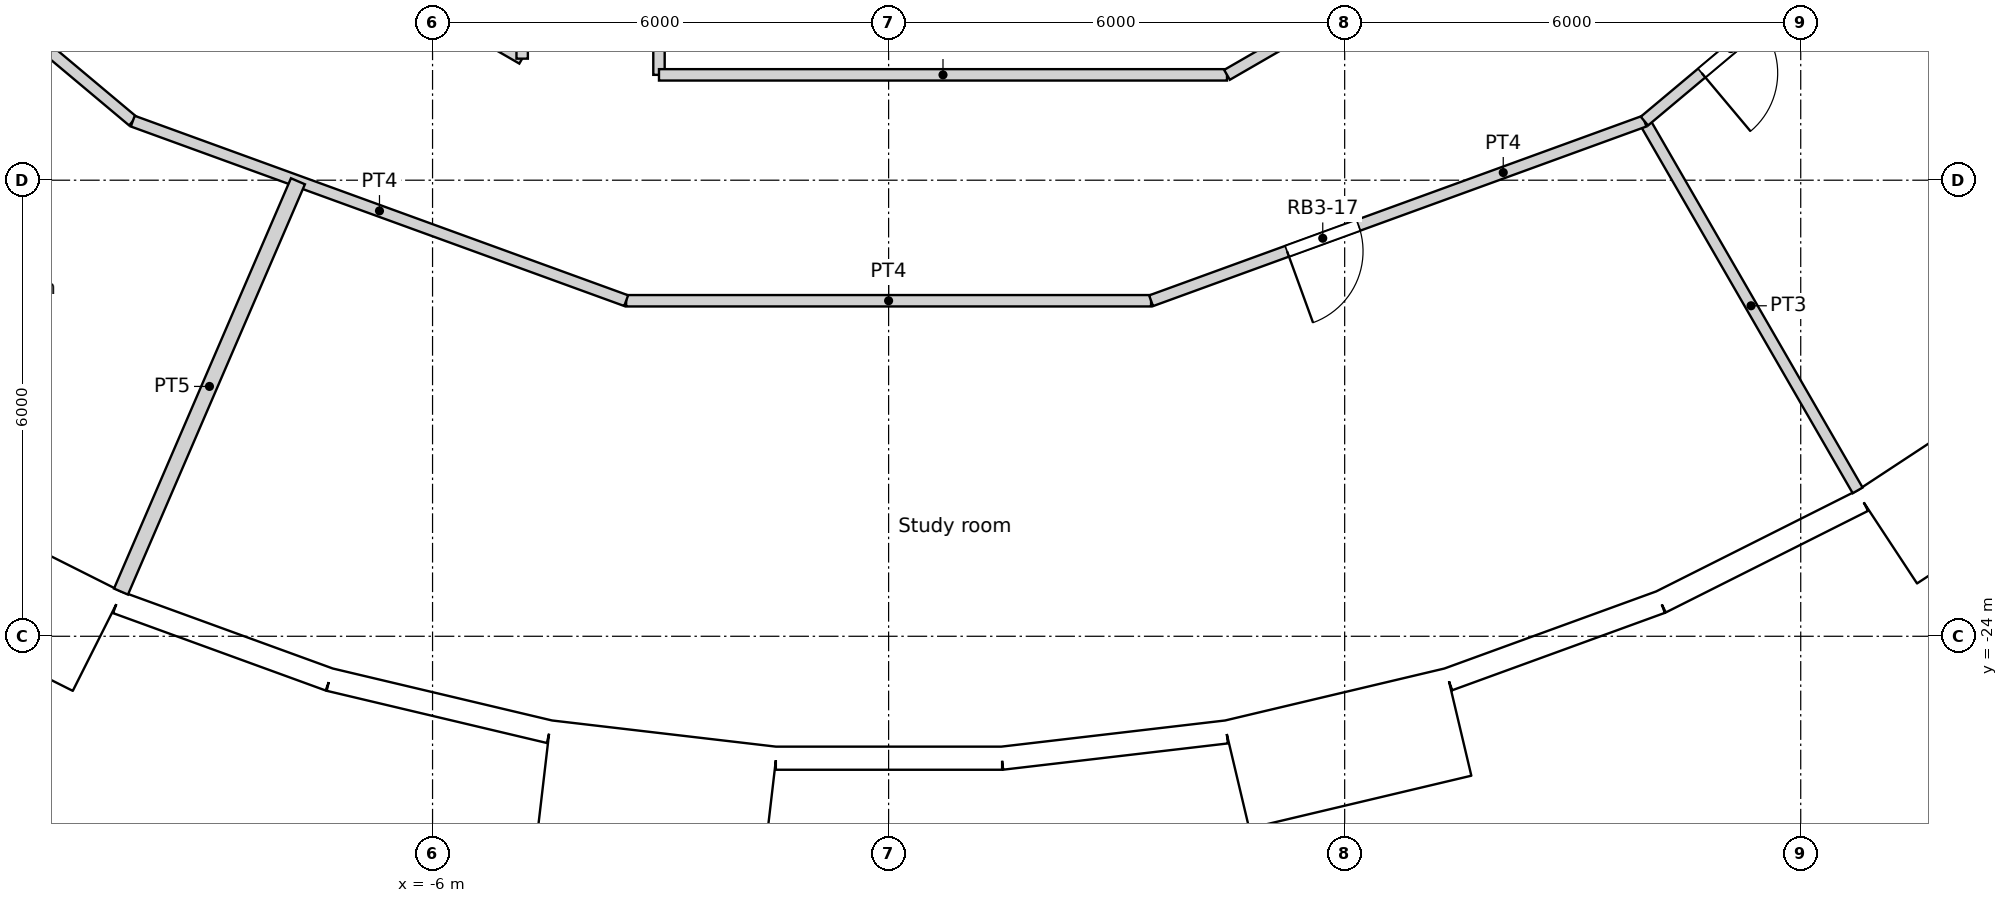
"""IFC4 building model, lengths in metres.
Left out: names, types, materials, properties, quantities, classifications, styles, units other than length and angle.
Written with IfcOpenShell. Run it as: python <this file> out.ifc"""

import sys

from ifc_helpers import new_model, si_unit, direction, frame, frame_2d, origin, origin_2d, place, context, subcontext, project, spatial, rectangle, circle, extrude, element, fill, save


model = new_model("IFC4")
c1 = context("Model", 3, precision=1e-05, world=origin(), true_north=direction((0.0, 1.0)))
c2 = subcontext(c1, "Body", "Model", "MODEL_VIEW")
j1 = project(units=[si_unit("LENGTHUNIT", "METRE"), si_unit("PLANEANGLEUNIT", "RADIAN")], contexts=[c1])
p1 = place(None, origin())
s1 = spatial("IfcSite", under=j1, at=p1, CompositionType="ELEMENT")
p2 = place(p1, origin())
s2 = spatial("IfcBuilding", under=s1, at=p2, CompositionType="ELEMENT")
p3 = place(p2, frame((0.0, 0.0, 147.6)))
s3 = spatial("IfcBuildingStorey", under=s2, at=p3, CompositionType="ELEMENT", Elevation=147.6)
for number, where, z_axis, x_axis in (
    (1, (-7.04, -23.516, 0.0), (0.0, 0.0, 1.0), (1.0, 0.0, 0.0)),
    (2, (-1.427, -24.506, 0.0), (0.0, 0.0, 1.0), (1.0, 0.0, 0.0)),
    (3, (4.263, -24.175, 0.0), (0.0, 0.0, 1.0), (1.0, 0.0, 0.0)),
    (4, (9.723, -22.54, 0.0), (0.0, 0.0, 1.0), (1.0, 0.0, 0.0)),
):
    element("IfcColumn", number, at=place(p3, frame(where, z_axis=z_axis, x_axis=x_axis)), inside=s3, PredefinedType="COLUMN", context=c2, shape_type="SweptSolid", body=[
        extrude(circle(Radius=0.6, at=origin_2d()), origin(), (0.0, 0.0, 1.0), 3.6),
    ])
for number, where, z_axis, x_axis in (
    (5, (-9.411, -16.301, 0.0), (0.0, 0.0, 1.0), (1.0, 0.0, 0.0)),
    (6, (-4.188, -18.35, 0.0), (0.0, 0.0, 1.0), (1.0, 0.0, 0.0)),
    (7, (1.406, -18.77, 0.0), (0.0, 0.0, 1.0), (1.0, 0.0, 0.0)),
    (8, (6.876, -17.521, 0.0), (0.0, 0.0, 1.0), (1.0, 0.0, 0.0)),
):
    element("IfcColumn", number, at=place(p3, frame(where, z_axis=z_axis, x_axis=x_axis)), inside=s3, PredefinedType="COLUMN", context=c2, shape_type="SweptSolid", body=[
        extrude(circle(Radius=0.65, at=origin_2d()), origin(), (0.0, 0.0, 1.0), 3.6),
    ])
p4 = place(p3, frame((-13.09, -22.721, -0.3), z_axis=(0.0, 0.0, 1.0), x_axis=(0.893628249713, -0.448807922518, 0.0)))
e9 = element("IfcWall", 9, at=p4, inside=s3, PredefinedType="ELEMENTEDWALL", context=c2, shape_type="SweptSolid", body=[
    extrude(rectangle(XDim=3.0, YDim=1.45, at=frame_2d((1.5, 0.0))), origin(), (0.0, 0.0, 1.0), 3.6),
])
p5 = place(p4, frame((1.5, 0.0, 1.85)))
e10 = element("IfcOpeningElement", 10, at=p5, cuts=e9, PredefinedType="OPENING", context=c2, shape_type="SweptSolid", body=[
    extrude(circle(Radius=0.9, at=origin_2d()), frame((0.0, 0.735, 0.0), z_axis=(0.0, -1.0, 0.0), x_axis=(1.0, 0.0, 0.0)), (0.0, 0.0, 1.0), 1.47),
])
p6 = place(p3, frame((-10.149, -23.553, 0.0), z_axis=(0.0, 0.0, 1.0), x_axis=(0.939690282133, -0.342026568652, 0.0)))
e11 = element("IfcWall", 11, at=p6, inside=s3, PredefinedType="SOLIDWALL", context=c2, shape_type="SweptSolid", body=[
    extrude(rectangle(XDim=2.973, YDim=0.3, at=frame_2d((1.486, 0.0))), origin(), (0.0, 0.0, 1.0), 3.3),
])
p7 = place(p6, frame((1.486, 0.0, 1.55)))
e12 = element("IfcOpeningElement", 12, at=p7, cuts=e11, PredefinedType="OPENING", context=c2, shape_type="SweptSolid", body=[
    extrude(circle(Radius=0.9, at=origin_2d()), frame((0.0, 0.16, 0.0), z_axis=(0.0, -1.0, 0.0), x_axis=(1.0, 0.0, 0.0)), (0.0, 0.0, 1.0), 0.32),
])
p8 = place(p3, frame((-7.356, -24.57, 0.0), z_axis=(0.0, 0.0, 1.0), x_axis=(0.973045378923, -0.230613725862, 0.0)))
e13 = element("IfcWall", 13, at=p8, inside=s3, PredefinedType="SOLIDWALL", context=c2, shape_type="SweptSolid", body=[
    extrude(rectangle(XDim=2.973, YDim=0.3, at=frame_2d((1.486, 0.0))), origin(), (0.0, 0.0, 1.0), 3.3),
])
p9 = place(p8, frame((1.486, 0.0, 1.55)))
e14 = element("IfcOpeningElement", 14, at=p9, cuts=e13, PredefinedType="OPENING", context=c2, shape_type="SweptSolid", body=[
    extrude(circle(Radius=0.9, at=origin_2d()), frame((0.0, 0.16, 0.0), z_axis=(0.0, -1.0, 0.0), x_axis=(1.0, 0.0, 0.0)), (0.0, 0.0, 1.0), 0.32),
])
p10 = place(p3, frame((-4.529, -25.828, -0.3), z_axis=(0.0, 0.0, 1.0), x_axis=(0.9932342274, -0.116128246006, 0.0)))
e15 = element("IfcWall", 15, at=p10, inside=s3, PredefinedType="ELEMENTEDWALL", context=c2, shape_type="SweptSolid", body=[
    extrude(rectangle(XDim=3.0, YDim=1.45, at=frame_2d((1.5, 0.0))), origin(), (0.0, 0.0, 1.0), 3.6),
])
p11 = place(p10, frame((1.5, 0.0, 1.85)))
e16 = element("IfcOpeningElement", 16, at=p11, cuts=e15, PredefinedType="OPENING", context=c2, shape_type="SweptSolid", body=[
    extrude(circle(Radius=0.9, at=origin_2d()), frame((0.0, 0.735, 0.0), z_axis=(0.0, -1.0, 0.0), x_axis=(1.0, 0.0, 0.0)), (0.0, 0.0, 1.0), 1.47),
])
p12 = place(p3, frame((-1.482, -25.604, 0.0), z_axis=(0.0, 0.0, 1.0), x_axis=(1.0, 0.0, 0.0)))
e17 = element("IfcWall", 17, at=p12, inside=s3, PredefinedType="SOLIDWALL", context=c2, shape_type="SweptSolid", body=[
    extrude(rectangle(XDim=2.973, YDim=0.3, at=frame_2d((1.486, 0.0))), origin(), (0.0, 0.0, 1.0), 3.3),
])
p13 = place(p12, frame((1.486, 0.0, 1.55)))
e18 = element("IfcOpeningElement", 18, at=p13, cuts=e17, PredefinedType="OPENING", context=c2, shape_type="SweptSolid", body=[
    extrude(circle(Radius=0.9, at=origin_2d()), frame((0.0, 0.16, 0.0), z_axis=(0.0, -1.0, 0.0), x_axis=(1.0, 0.0, 0.0)), (0.0, 0.0, 1.0), 0.32),
])
p14 = place(p3, frame((1.491, -25.604, 0.0), z_axis=(0.0, 0.0, 1.0), x_axis=(0.993245010522, 0.1160359818, 0.0)))
e19 = element("IfcWall", 19, at=p14, inside=s3, PredefinedType="SOLIDWALL", context=c2, shape_type="SweptSolid", body=[
    extrude(rectangle(XDim=2.973, YDim=0.3, at=frame_2d((1.486, 0.0))), origin(), (0.0, 0.0, 1.0), 3.3),
])
p15 = place(p14, frame((1.486, 0.0, 1.55)))
e20 = element("IfcOpeningElement", 20, at=p15, cuts=e19, PredefinedType="OPENING", context=c2, shape_type="SweptSolid", body=[
    extrude(circle(Radius=0.9, at=origin_2d()), frame((0.0, 0.16, 0.0), z_axis=(0.0, -1.0, 0.0), x_axis=(1.0, 0.0, 0.0)), (0.0, 0.0, 1.0), 0.32),
])
p16 = place(p3, frame((4.578, -25.819, -0.3), z_axis=(0.0, 0.0, 1.0), x_axis=(0.973042333261, 0.23062657627, 0.0)))
e21 = element("IfcWall", 21, at=p16, inside=s3, PredefinedType="ELEMENTEDWALL", context=c2, shape_type="SweptSolid", body=[
    extrude(rectangle(XDim=3.0, YDim=1.45, at=frame_2d((1.5, 0.0))), origin(), (0.0, 0.0, 1.0), 3.6),
])
p17 = place(p16, frame((1.5, 0.0, 1.85)))
e22 = element("IfcOpeningElement", 22, at=p17, cuts=e21, PredefinedType="OPENING", context=c2, shape_type="SweptSolid", body=[
    extrude(circle(Radius=0.9, at=origin_2d()), frame((0.0, 0.735, 0.0), z_axis=(0.0, -1.0, 0.0), x_axis=(1.0, 0.0, 0.0)), (0.0, 0.0, 1.0), 1.47),
])
p18 = place(p3, frame((7.365, -24.567, 0.0), z_axis=(0.0, 0.0, 1.0), x_axis=(0.939690282133, 0.342026568652, 0.0)))
e23 = element("IfcWall", 23, at=p18, inside=s3, PredefinedType="SOLIDWALL", context=c2, shape_type="SweptSolid", body=[
    extrude(rectangle(XDim=2.973, YDim=0.3, at=frame_2d((1.486, 0.0))), origin(), (0.0, 0.0, 1.0), 3.3),
])
p19 = place(p18, frame((1.486, 0.0, 1.55)))
e24 = element("IfcOpeningElement", 24, at=p19, cuts=e23, PredefinedType="OPENING", context=c2, shape_type="SweptSolid", body=[
    extrude(circle(Radius=0.9, at=origin_2d()), frame((0.0, 0.16, 0.0), z_axis=(0.0, -1.0, 0.0), x_axis=(1.0, 0.0, 0.0)), (0.0, 0.0, 1.0), 0.32),
])
p20 = place(p3, frame((10.158, -23.55, 0.0), z_axis=(0.0, 0.0, 1.0), x_axis=(0.893637442555, 0.448789618045, 0.0)))
e25 = element("IfcWall", 25, at=p20, inside=s3, PredefinedType="SOLIDWALL", context=c2, shape_type="SweptSolid", body=[
    extrude(rectangle(XDim=2.973, YDim=0.3, at=frame_2d((1.486, 0.0))), origin(), (0.0, 0.0, 1.0), 3.3),
])
p21 = place(p20, frame((1.486, 0.0, 1.55)))
e26 = element("IfcOpeningElement", 26, at=p21, cuts=e25, PredefinedType="OPENING", context=c2, shape_type="SweptSolid", body=[
    extrude(circle(Radius=0.9, at=origin_2d()), frame((0.0, 0.16, 0.0), z_axis=(0.0, -1.0, 0.0), x_axis=(1.0, 0.0, 0.0)), (0.0, 0.0, 1.0), 0.32),
])
p22 = place(p3, frame((13.132, -22.697, -0.3), z_axis=(0.0, 0.0, 1.0), x_axis=(0.835514416706, 0.549468524554, 0.0)))
e27 = element("IfcWall", 27, at=p22, inside=s3, PredefinedType="ELEMENTEDWALL", context=c2, shape_type="SweptSolid", body=[
    extrude(rectangle(XDim=3.0, YDim=1.45, at=frame_2d((1.5, 0.0))), origin(), (0.0, 0.0, 1.0), 3.6),
])
p23 = place(p22, frame((1.5, 0.0, 1.85)))
e28 = element("IfcOpeningElement", 28, at=p23, cuts=e27, PredefinedType="OPENING", context=c2, shape_type="SweptSolid", body=[
    extrude(circle(Radius=0.9, at=origin_2d()), frame((0.0, 0.735, 0.0), z_axis=(0.0, -1.0, 0.0), x_axis=(1.0, 0.0, 0.0)), (0.0, 0.0, 1.0), 1.47),
])
p24 = place(p3, frame((9.943, -17.222, 0.0), z_axis=(0.0, 0.0, 1.0), x_axis=(0.766192104565, 0.642611592567, 0.0)))
e29 = element("IfcWall", 29, at=p24, inside=s3, PredefinedType="PARTITIONING", context=c2, shape_type="SweptSolid", body=[
    extrude(rectangle(XDim=6.906, YDim=0.15, at=frame_2d((3.453, 0.0))), origin(), (0.0, 0.0, 1.0), 3.3),
])
p25 = place(p24, frame((0.984, 0.0, 0.0)))
e30 = element("IfcOpeningElement", 30, at=p25, cuts=e29, PredefinedType="OPENING", context=c2, shape_type="SweptSolid", body=[
    extrude(rectangle(XDim=1.0, YDim=2.04, at=frame_2d((0.5, 1.02))), frame((0.0, 0.075, 0.0), z_axis=(0.0, -1.0, 0.0), x_axis=(1.0, 0.0, 0.0)), (0.0, 0.0, 1.0), 0.15),
])
p26 = place(p3, frame((-15.235, -12.784, 0.0), z_axis=(0.0, 0.0, 1.0), x_axis=(0.766192104565, -0.642611592567, 0.0)))
e31 = element("IfcWall", 31, at=p26, inside=s3, PredefinedType="PARTITIONING", context=c2, shape_type="SweptSolid", body=[
    extrude(rectangle(XDim=6.906, YDim=0.15, at=frame_2d((3.453, 0.0))), origin(), (0.0, 0.0, 1.0), 3.3),
])
p27 = place(p26, frame((4.133, 0.0, 0.0)))
e32 = element("IfcOpeningElement", 32, at=p27, cuts=e31, PredefinedType="OPENING", context=c2, shape_type="SweptSolid", body=[
    extrude(rectangle(XDim=0.95, YDim=2.1, at=frame_2d((0.475, 1.05))), frame((0.0, 0.075, 0.0), z_axis=(0.0, -1.0, 0.0), x_axis=(1.0, 0.0, 0.0)), (0.0, 0.0, 1.0), 0.15),
])
p28 = place(p3, frame((-12.162, -12.162, 0.0), z_axis=(0.0, 0.0, 1.0), x_axis=(0.866004766557, -0.500035743023, 0.0)))
e33 = element("IfcWall", 33, at=p28, inside=s3, PredefinedType="PARTITIONING", context=c2, shape_type="SweptSolid", body=[
    extrude(rectangle(XDim=8.477, YDim=0.15, at=frame_2d((4.239, 0.0))), origin(), (0.0, 0.0, 1.0), 3.3),
])
p29 = place(p28, frame((3.738, 0.0, 0.0)))
e34 = element("IfcOpeningElement", 34, at=p29, cuts=e33, PredefinedType="OPENING", context=c2, shape_type="SweptSolid", body=[
    extrude(rectangle(XDim=1.0, YDim=2.04, at=frame_2d((0.5, 1.02))), frame((0.0, 0.075, 0.0), z_axis=(0.0, -1.0, 0.0), x_axis=(1.0, 0.0, 0.0)), (0.0, 0.0, 1.0), 0.15),
])
p30 = place(p3, frame((-4.821, -16.401, 0.0), z_axis=(0.0, 0.0, 1.0), x_axis=(0.0, 1.0, 0.0)))
e35 = element("IfcWall", 35, at=p30, inside=s3, PredefinedType="PARTITIONING", context=c2, shape_type="SweptSolid", body=[
    extrude(rectangle(XDim=6.101, YDim=0.15, at=frame_2d((3.05, 0.0))), origin(), (0.0, 0.0, 1.0), 3.3),
])
p31 = place(p3, frame((-3.021, -16.614, 0.0), z_axis=(0.0, 0.0, 1.0), x_axis=(0.0, 1.0, 0.0)))
e36 = element("IfcWall", 36, at=p31, inside=s3, PredefinedType="PARTITIONING", context=c2, shape_type="SweptSolid", body=[
    extrude(rectangle(XDim=6.314, YDim=0.15, at=frame_2d((3.157, 0.0))), origin(), (0.0, 0.0, 1.0), 3.3),
])
p32 = place(p3, frame((-3.021, -16.614, 0.0), z_axis=(0.0, 0.0, 1.0), x_axis=(1.0, 0.0, 0.0)))
e37 = element("IfcWall", 37, at=p32, inside=s3, PredefinedType="PARTITIONING", context=c2, shape_type="SweptSolid", body=[
    extrude(rectangle(XDim=7.473, YDim=0.15, at=frame_2d((3.736, 0.0))), origin(), (0.0, 0.0, 1.0), 3.3),
])
p33 = place(p3, frame((4.452, -16.614, 0.0), z_axis=(0.0, 0.0, 1.0), x_axis=(0.866005203721, 0.500034985904, 0.0)))
e38 = element("IfcWall", 38, at=p33, inside=s3, PredefinedType="PARTITIONING", context=c2, shape_type="SweptSolid", body=[
    extrude(rectangle(XDim=8.903, YDim=0.15, at=frame_2d((4.452, 0.0))), origin(), (0.0, 0.0, 1.0), 3.3),
])
p34 = place(p3, frame((-9.944, -17.223, 0.0), z_axis=(0.0, 0.0, 1.0), x_axis=(0.939737689664, -0.341896292208, 0.0)))
e39 = element("IfcWall", 39, at=p34, inside=s3, PredefinedType="PARTITIONING", context=c2, shape_type="SweptSolid", body=[
    extrude(rectangle(XDim=6.908, YDim=0.15, at=frame_2d((3.454, 0.0))), origin(), (0.0, 0.0, 1.0), 3.3),
])
p35 = place(p3, frame((3.453, -19.586, 0.0), z_axis=(0.0, 0.0, 1.0), x_axis=(0.939672634566, 0.342075050021, 0.0)))
e40 = element("IfcWall", 40, at=p35, inside=s3, PredefinedType="PARTITIONING", context=c2, shape_type="SweptSolid", body=[
    extrude(rectangle(XDim=6.908, YDim=0.15, at=frame_2d((3.454, 0.0))), origin(), (0.0, 0.0, 1.0), 3.3),
])
p36 = place(p35, frame((1.904, 0.0, 0.0)))
e41 = element("IfcOpeningElement", 41, at=p36, cuts=e40, PredefinedType="OPENING", context=c2, shape_type="SweptSolid", body=[
    extrude(rectangle(XDim=1.0, YDim=2.04, at=frame_2d((0.5, 1.02))), frame((0.0, 0.075, 0.0), z_axis=(0.0, -1.0, 0.0), x_axis=(1.0, 0.0, 0.0)), (0.0, 0.0, 1.0), 0.15),
])
p37 = place(p3, frame((-3.453, -19.586, 0.0), z_axis=(0.0, 0.0, 1.0), x_axis=(1.0, 0.0, 0.0)))
e42 = element("IfcWall", 42, at=p37, inside=s3, PredefinedType="PARTITIONING", context=c2, shape_type="SweptSolid", body=[
    extrude(rectangle(XDim=6.906, YDim=0.15, at=frame_2d((3.453, 0.0))), origin(), (0.0, 0.0, 1.0), 3.3),
])
p38 = place(p3, frame((-10.099, -23.412, 0.0), z_axis=(0.0, 0.0, 1.0), x_axis=(0.39601833725, 0.918242602236, 0.0)))
e43 = element("IfcWall", 43, at=p38, inside=s3, PredefinedType="PARTITIONING", context=c2, shape_type="SweptSolid", body=[
    extrude(rectangle(XDim=5.879, YDim=0.2, at=frame_2d((2.939, 0.0))), origin(), (0.0, 0.0, 1.0), 3.3),
])
p39 = place(p3, frame((9.944, -17.223, 0.0), z_axis=(0.0, 0.0, 1.0), x_axis=(0.500010020406, -0.866019618423, 0.0)))
e44 = element("IfcWall", 44, at=p39, inside=s3, PredefinedType="PARTITIONING", context=c2, shape_type="SweptSolid", body=[
    extrude(rectangle(XDim=5.61, YDim=0.15, at=frame_2d((2.805, 0.0))), origin(), (0.0, 0.0, 1.0), 3.3),
])
p40 = place(p5, origin())
e45 = element("IfcWindow", 45, at=p40, inside=s3, PartitioningType="SINGLE_PANEL", PredefinedType="WINDOW", context=c2, shape_type="SweptSolid", body=[
    extrude(circle(Radius=0.9, at=origin_2d()), frame((0.0, 0.695, 0.0), z_axis=(0.0, -1.0, 0.0), x_axis=(1.0, 0.0, 0.0)), (0.0, 0.0, 1.0), 0.1),
])
fill(e10, e45)
p41 = place(p7, origin())
e46 = element("IfcWindow", 46, at=p41, inside=s3, PartitioningType="SINGLE_PANEL", PredefinedType="WINDOW", context=c2, shape_type="SweptSolid", body=[
    extrude(circle(Radius=0.9, at=origin_2d()), frame((0.0, 0.12, 0.0), z_axis=(0.0, -1.0, 0.0), x_axis=(1.0, 0.0, 0.0)), (0.0, 0.0, 1.0), 0.1),
])
fill(e12, e46)
p42 = place(p9, origin())
e47 = element("IfcWindow", 47, at=p42, inside=s3, PartitioningType="SINGLE_PANEL", PredefinedType="WINDOW", context=c2, shape_type="SweptSolid", body=[
    extrude(circle(Radius=0.9, at=origin_2d()), frame((0.0, 0.12, 0.0), z_axis=(0.0, -1.0, 0.0), x_axis=(1.0, 0.0, 0.0)), (0.0, 0.0, 1.0), 0.1),
])
fill(e14, e47)
p43 = place(p11, origin())
e48 = element("IfcWindow", 48, at=p43, inside=s3, PartitioningType="SINGLE_PANEL", PredefinedType="WINDOW", context=c2, shape_type="SweptSolid", body=[
    extrude(circle(Radius=0.9, at=origin_2d()), frame((0.0, 0.695, 0.0), z_axis=(0.0, -1.0, 0.0), x_axis=(1.0, 0.0, 0.0)), (0.0, 0.0, 1.0), 0.1),
])
fill(e16, e48)
p44 = place(p13, origin())
e49 = element("IfcWindow", 49, at=p44, inside=s3, PartitioningType="SINGLE_PANEL", PredefinedType="WINDOW", context=c2, shape_type="SweptSolid", body=[
    extrude(circle(Radius=0.9, at=origin_2d()), frame((0.0, 0.12, 0.0), z_axis=(0.0, -1.0, 0.0), x_axis=(1.0, 0.0, 0.0)), (0.0, 0.0, 1.0), 0.1),
])
fill(e18, e49)
p45 = place(p15, origin())
e50 = element("IfcWindow", 50, at=p45, inside=s3, PartitioningType="SINGLE_PANEL", PredefinedType="WINDOW", context=c2, shape_type="SweptSolid", body=[
    extrude(circle(Radius=0.9, at=origin_2d()), frame((0.0, 0.12, 0.0), z_axis=(0.0, -1.0, 0.0), x_axis=(1.0, 0.0, 0.0)), (0.0, 0.0, 1.0), 0.1),
])
fill(e20, e50)
p46 = place(p17, origin())
e51 = element("IfcWindow", 51, at=p46, inside=s3, PartitioningType="SINGLE_PANEL", PredefinedType="WINDOW", context=c2, shape_type="SweptSolid", body=[
    extrude(circle(Radius=0.9, at=origin_2d()), frame((0.0, 0.695, 0.0), z_axis=(0.0, -1.0, 0.0), x_axis=(1.0, 0.0, 0.0)), (0.0, 0.0, 1.0), 0.1),
])
fill(e22, e51)
p47 = place(p19, origin())
e52 = element("IfcWindow", 52, at=p47, inside=s3, PartitioningType="SINGLE_PANEL", PredefinedType="WINDOW", context=c2, shape_type="SweptSolid", body=[
    extrude(circle(Radius=0.9, at=origin_2d()), frame((0.0, 0.12, 0.0), z_axis=(0.0, -1.0, 0.0), x_axis=(1.0, 0.0, 0.0)), (0.0, 0.0, 1.0), 0.1),
])
fill(e24, e52)
p48 = place(p21, origin())
e53 = element("IfcWindow", 53, at=p48, inside=s3, PartitioningType="SINGLE_PANEL", PredefinedType="WINDOW", context=c2, shape_type="SweptSolid", body=[
    extrude(circle(Radius=0.9, at=origin_2d()), frame((0.0, 0.12, 0.0), z_axis=(0.0, -1.0, 0.0), x_axis=(1.0, 0.0, 0.0)), (0.0, 0.0, 1.0), 0.1),
])
fill(e26, e53)
p49 = place(p23, origin())
e54 = element("IfcWindow", 54, at=p49, inside=s3, PartitioningType="SINGLE_PANEL", PredefinedType="WINDOW", context=c2, shape_type="SweptSolid", body=[
    extrude(circle(Radius=0.9, at=origin_2d()), frame((0.0, 0.695, 0.0), z_axis=(0.0, -1.0, 0.0), x_axis=(1.0, 0.0, 0.0)), (0.0, 0.0, 1.0), 0.1),
])
fill(e28, e54)
p50 = place(p36, origin())
e55 = element("IfcDoor", 55, at=p50, inside=s3, OperationType="SINGLE_SWING_RIGHT", PredefinedType="DOOR", context=c2, shape_type="SweptSolid", body=[
    extrude(rectangle(XDim=1.0, YDim=2.04, at=frame_2d((0.5, 1.02))), frame((0.0, 0.025, 0.0), z_axis=(0.0, -1.0, 0.0), x_axis=(1.0, 0.0, 0.0)), (0.0, 0.0, 1.0), 0.05),
])
fill(e41, e55)
p51 = place(p25, origin())
e56 = element("IfcDoor", 56, at=p51, inside=s3, OperationType="SINGLE_SWING_RIGHT", PredefinedType="DOOR", context=c2, shape_type="SweptSolid", body=[
    extrude(rectangle(XDim=1.0, YDim=2.04, at=frame_2d((0.5, 1.02))), frame((0.0, 0.025, 0.0), z_axis=(0.0, -1.0, 0.0), x_axis=(1.0, 0.0, 0.0)), (0.0, 0.0, 1.0), 0.05),
])
fill(e30, e56)
save(model, sys.argv[1])
